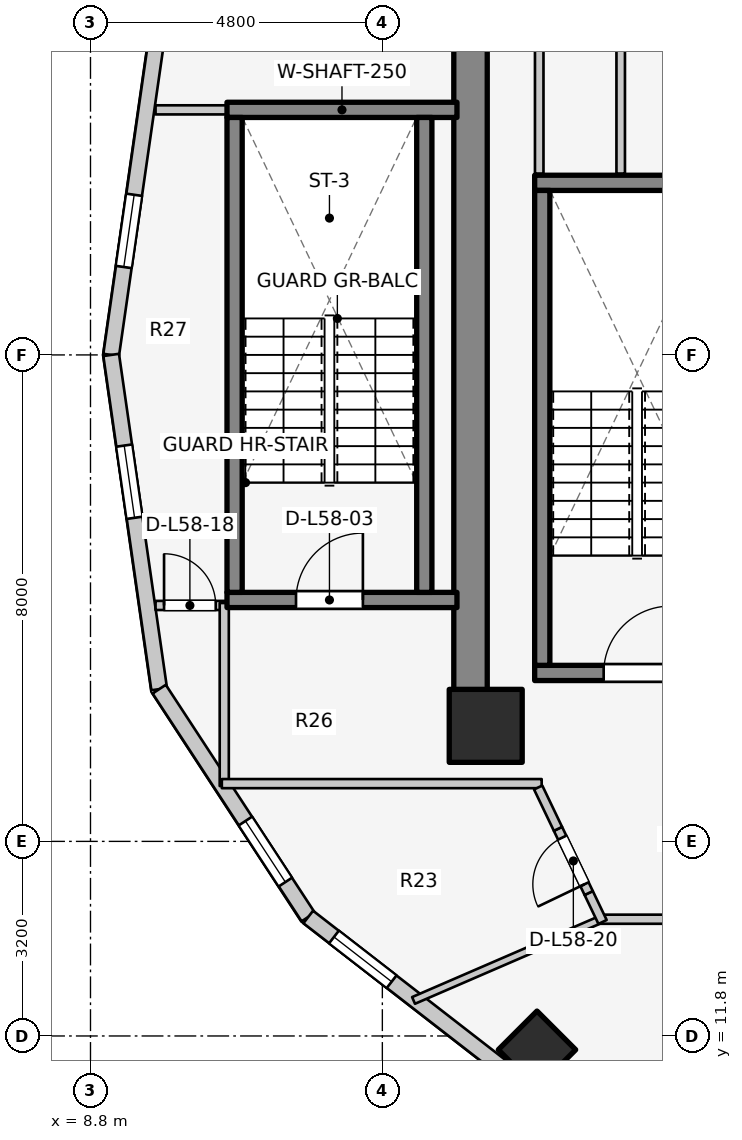
"""IFC4 building model, lengths in metres.
Left out: names, types, materials, properties, quantities, classifications, styles, units other than length and angle.
Written with IfcOpenShell. Run it as: python <this file> out.ifc"""

import sys

from ifc_helpers import new_model, si_unit, direction, frame, frame_2d, origin, origin_2d, place, context, subcontext, project, spatial, rectangle, extrude, element, fill, save


model = new_model("IFC4")
c1 = context("Model", 3, precision=1e-05, world=origin(), true_north=direction((0.0, 1.0)))
c2 = subcontext(c1, "Body", "Model", "MODEL_VIEW")
j1 = project(units=[si_unit("LENGTHUNIT", "METRE"), si_unit("PLANEANGLEUNIT", "RADIAN")], contexts=[c1])
p1 = place(None, origin())
s1 = spatial("IfcSite", under=j1, at=p1, CompositionType="ELEMENT")
p2 = place(p1, origin())
s2 = spatial("IfcBuilding", under=s1, at=p2, CompositionType="ELEMENT")
p3 = place(p2, frame((0.0, 0.0, 190.1)))
s3 = spatial("IfcBuildingStorey", under=s2, at=p3, CompositionType="ELEMENT", Elevation=190.1)
p4 = place(p3, frame((15.05, 17.05, 0.0), z_axis=(0.0, 0.0, 1.0), x_axis=(0.0, 1.0, 0.0)))
e1 = element("IfcWall", 1, at=p4, inside=s3, PredefinedType="SHEAR", context=c2, shape_type="SweptSolid", body=[
    extrude(rectangle(XDim=12.8, YDim=0.55, at=frame_2d((6.4, 0.0))), origin(), (0.0, 0.0, 1.0), 3.1),
])
p5 = place(p3, frame((16.105, 17.77, 0.0), z_axis=(0.0, 0.0, 1.0), x_axis=(1.0, 0.0, 0.0)))
e2 = element("IfcWall", 2, at=p5, inside=s3, PredefinedType="SOLIDWALL", context=c2, shape_type="SweptSolid", body=[
    extrude(rectangle(XDim=3.37, YDim=0.25, at=frame_2d((1.685, 0.0))), origin(), (0.0, 0.0, 1.0), 3.1),
])
p6 = place(p5, frame((1.135, 0.0, 0.0)))
e3 = element("IfcOpeningElement", 3, at=p6, cuts=e2, PredefinedType="OPENING", context=c2, shape_type="SweptSolid", body=[
    extrude(rectangle(XDim=1.1, YDim=2.1, at=frame_2d((0.55, 1.05))), frame((0.0, 0.135, 0.0), z_axis=(0.0, -1.0, 0.0), x_axis=(1.0, 0.0, 0.0)), (0.0, 0.0, 1.0), 0.27),
])
p7 = place(p3, frame((16.105, 25.83, 0.0), z_axis=(0.0, 0.0, 1.0), x_axis=(1.0, 0.0, 0.0)))
e4 = element("IfcWall", 4, at=p7, inside=s3, PredefinedType="SOLIDWALL", context=c2, shape_type="SweptSolid", body=[
    extrude(rectangle(XDim=3.37, YDim=0.25, at=frame_2d((1.685, 0.0))), origin(), (0.0, 0.0, 1.0), 3.1),
])
p8 = place(p3, frame((16.23, 17.895, 0.0), z_axis=(0.0, 0.0, 1.0), x_axis=(0.0, 1.0, 0.0)))
e5 = element("IfcWall", 5, at=p8, inside=s3, PredefinedType="SOLIDWALL", context=c2, shape_type="SweptSolid", body=[
    extrude(rectangle(XDim=7.81, YDim=0.25, at=frame_2d((3.905, 0.0))), origin(), (0.0, 0.0, 1.0), 3.1),
])
p9 = place(p3, frame((11.045, 18.97, 0.0), z_axis=(0.0, 0.0, 1.0), x_axis=(1.0, 0.0, 0.0)))
e6 = element("IfcWall", 6, at=p9, inside=s3, PredefinedType="SOLIDWALL", context=c2, shape_type="SweptSolid", body=[
    extrude(rectangle(XDim=3.782, YDim=0.25, at=frame_2d((1.891, 0.0))), origin(), (0.0, 0.0, 1.0), 3.1),
])
p10 = place(p9, frame((1.135, 0.0, 0.0)))
e7 = element("IfcOpeningElement", 7, at=p10, cuts=e6, PredefinedType="OPENING", context=c2, shape_type="SweptSolid", body=[
    extrude(rectangle(XDim=1.1, YDim=2.1, at=frame_2d((0.55, 1.05))), frame((0.0, 0.135, 0.0), z_axis=(0.0, -1.0, 0.0), x_axis=(1.0, 0.0, 0.0)), (0.0, 0.0, 1.0), 0.27),
])
p11 = place(p3, frame((11.045, 27.03, 0.0), z_axis=(0.0, 0.0, 1.0), x_axis=(1.0, 0.0, 0.0)))
e8 = element("IfcWall", 8, at=p11, inside=s3, PredefinedType="SOLIDWALL", context=c2, shape_type="SweptSolid", body=[
    extrude(rectangle(XDim=3.782, YDim=0.25, at=frame_2d((1.891, 0.0))), origin(), (0.0, 0.0, 1.0), 3.1),
])
for number, where, z_axis, x_axis in (
    (9, (11.17, 19.095, 0.0), (0.0, 0.0, 1.0), (0.0, 1.0, 0.0)),
    (10, (14.29, 19.095, 0.0), (0.0, 0.0, 1.0), (0.0, 1.0, 0.0)),
):
    element("IfcWall", number, at=place(p3, frame(where, z_axis=z_axis, x_axis=x_axis)), inside=s3, PredefinedType="SOLIDWALL", context=c2, shape_type="SweptSolid", body=[
        extrude(rectangle(XDim=7.81, YDim=0.25, at=frame_2d((3.905, 0.0))), origin(), (0.0, 0.0, 1.0), 3.1),
    ])
p12 = place(p3, frame((15.3, 16.9, 0.0), z_axis=(0.0, 0.0, 1.0), x_axis=(1.0, 0.0, 0.0)))
e11 = element("IfcColumn", 11, at=p12, inside=s3, PredefinedType="COLUMN", context=c2, shape_type="SweptSolid", body=[
    extrude(rectangle(XDim=1.2, YDim=1.2, at=origin_2d()), origin(), (0.0, 0.0, 1.0), 3.1),
])
p13 = place(p3, frame((16.143, 11.573, 0.0), z_axis=(0.0, 0.0, 1.0), x_axis=(-0.707106781187, -0.707106781187, 0.0)))
e12 = element("IfcColumn", 12, at=p13, inside=s3, PredefinedType="COLUMN", context=c2, shape_type="SweptSolid", body=[
    extrude(rectangle(XDim=0.9, YDim=0.9, at=origin_2d()), origin(), (0.0, 0.0, 1.0), 3.1),
])
p14 = place(p3, frame((9.93, 28.497, 0.0), z_axis=(0.0, 0.0, 1.0), x_axis=(-0.142227632286, -0.989833976288, 0.0)))
e13 = element("IfcWall", 13, at=p14, inside=s3, PredefinedType="STANDARD", context=c2, shape_type="SweptSolid", body=[
    extrude(rectangle(XDim=5.553, YDim=0.26, at=frame_2d((2.776, 0.0))), origin(), (0.0, 0.0, 1.0), 2.57),
])
p15 = place(p14, frame((2.892, 0.0, 0.75)))
e14 = element("IfcOpeningElement", 14, at=p15, cuts=e13, PredefinedType="OPENING", context=c2, shape_type="SweptSolid", body=[
    extrude(rectangle(XDim=1.2, YDim=1.5, at=frame_2d((0.6, 0.75))), frame((0.0, 0.14, 0.0), z_axis=(0.0, -1.0, 0.0), x_axis=(1.0, 0.0, 0.0)), (0.0, 0.0, 1.0), 0.28),
])
p16 = place(p3, frame((9.14, 23.0, 0.0), z_axis=(0.0, 0.0, 1.0), x_axis=(0.142227632286, -0.989833976288, 0.0)))
e15 = element("IfcWall", 15, at=p16, inside=s3, PredefinedType="STANDARD", context=c2, shape_type="SweptSolid", body=[
    extrude(rectangle(XDim=5.553, YDim=0.26, at=frame_2d((2.776, 0.0))), origin(), (0.0, 0.0, 1.0), 2.57),
])
p17 = place(p16, frame((1.506, 0.0, 0.75)))
e16 = element("IfcOpeningElement", 16, at=p17, cuts=e15, PredefinedType="OPENING", context=c2, shape_type="SweptSolid", body=[
    extrude(rectangle(XDim=1.2, YDim=1.5, at=frame_2d((0.6, 0.75))), frame((0.0, 0.14, 0.0), z_axis=(0.0, -1.0, 0.0), x_axis=(1.0, 0.0, 0.0)), (0.0, 0.0, 1.0), 0.28),
])
p18 = place(p3, frame((9.93, 17.503, 0.0), z_axis=(0.0, 0.0, 1.0), x_axis=(0.547456494366, -0.836834145322, 0.0)))
e17 = element("IfcWall", 17, at=p18, inside=s3, PredefinedType="STANDARD", context=c2, shape_type="SweptSolid", body=[
    extrude(rectangle(XDim=4.477, YDim=0.26, at=frame_2d((2.239, 0.0))), origin(), (0.0, 0.0, 1.0), 1.22),
])
p19 = place(p18, frame((2.591, 0.0, 0.15)))
e18 = element("IfcOpeningElement", 18, at=p19, cuts=e17, PredefinedType="OPENING", context=c2, shape_type="SweptSolid", body=[
    extrude(rectangle(XDim=1.2, YDim=0.9, at=frame_2d((0.6, 0.45))), frame((0.0, 0.14, 0.0), z_axis=(0.0, -1.0, 0.0), x_axis=(1.0, 0.0, 0.0)), (0.0, 0.0, 1.0), 0.28),
])
p20 = place(p3, frame((12.381, 13.757, 0.0), z_axis=(0.0, 0.0, 1.0), x_axis=(0.790185650662, -0.612867552973, 0.0)))
e19 = element("IfcWall", 19, at=p20, inside=s3, PredefinedType="STANDARD", context=c2, shape_type="SweptSolid", body=[
    extrude(rectangle(XDim=4.239, YDim=0.26, at=frame_2d((2.12, 0.0))), origin(), (0.0, 0.0, 1.0), 1.22),
])
p21 = place(p20, frame((0.536, 0.0, 0.15)))
e20 = element("IfcOpeningElement", 20, at=p21, cuts=e19, PredefinedType="OPENING", context=c2, shape_type="SweptSolid", body=[
    extrude(rectangle(XDim=1.2, YDim=0.9, at=frame_2d((0.6, 0.45))), frame((0.0, 0.14, 0.0), z_axis=(0.0, -1.0, 0.0), x_axis=(1.0, 0.0, 0.0)), (0.0, 0.0, 1.0), 0.28),
])
for number, where, z_axis, x_axis in (
    (21, (16.18, 25.98, 0.0), (0.0, 0.0, 1.0), (0.0, 1.0, 0.0)),
    (22, (17.52, 25.98, 0.0), (0.0, 0.0, 1.0), (0.0, 1.0, 0.0)),
):
    element("IfcWall", number, at=place(p3, frame(where, z_axis=z_axis, x_axis=x_axis)), inside=s3, PredefinedType="PLUMBINGWALL", context=c2, shape_type="SweptSolid", body=[
        extrude(rectangle(XDim=3.88, YDim=0.14, at=frame_2d((1.94, 0.0))), origin(), (0.0, 0.0, 1.0), 2.575),
    ])
p22 = place(p3, frame((9.87, 27.03, 0.0), z_axis=(0.0, 0.0, 1.0), x_axis=(1.0, 0.0, 0.0)))
e23 = element("IfcWall", 23, at=p22, inside=s3, PredefinedType="PARTITIONING", context=c2, shape_type="SweptSolid", body=[
    extrude(rectangle(XDim=1.17, YDim=0.15, at=frame_2d((0.585, 0.0))), origin(), (0.0, 0.0, 1.0), 2.575),
])
p23 = place(p3, frame((9.87, 18.88, 0.0), z_axis=(0.0, 0.0, 1.0), x_axis=(1.0, 0.0, 0.0)))
e24 = element("IfcWall", 24, at=p23, inside=s3, PredefinedType="PARTITIONING", context=c2, shape_type="SweptSolid", body=[
    extrude(rectangle(XDim=1.17, YDim=0.15, at=frame_2d((0.585, 0.0))), origin(), (0.0, 0.0, 1.0), 2.575),
])
p24 = place(p23, frame((0.14, 0.0, 0.0)))
e25 = element("IfcOpeningElement", 25, at=p24, cuts=e24, PredefinedType="OPENING", context=c2, shape_type="SweptSolid", body=[
    extrude(rectangle(XDim=0.85, YDim=2.05, at=frame_2d((0.425, 1.025))), frame((0.0, 0.085, 0.0), z_axis=(0.0, -1.0, 0.0), x_axis=(1.0, 0.0, 0.0)), (0.0, 0.0, 1.0), 0.17),
])
p25 = place(p3, frame((11.0, 15.91, 0.0), z_axis=(0.0, 0.0, 1.0), x_axis=(0.0, 1.0, 0.0)))
e26 = element("IfcWall", 26, at=p25, inside=s3, PredefinedType="PARTITIONING", context=c2, shape_type="SweptSolid", body=[
    extrude(rectangle(XDim=3.01, YDim=0.15, at=frame_2d((1.505, 0.0))), origin(), (0.0, 0.0, 1.0), 2.575),
])
p26 = place(p3, frame((10.96, 15.95, 0.0), z_axis=(0.0, 0.0, 1.0), x_axis=(1.0, 0.0, 0.0)))
e27 = element("IfcWall", 27, at=p26, inside=s3, PredefinedType="PARTITIONING", context=c2, shape_type="SweptSolid", body=[
    extrude(rectangle(XDim=5.26, YDim=0.15, at=frame_2d((2.63, 0.0))), origin(), (0.0, 0.0, 1.0), 1.22),
])
p27 = place(p3, frame((17.246, 13.74, 0.0), z_axis=(0.0, 0.0, 1.0), x_axis=(-0.917766865873, -0.397119604031, 0.0)))
e28 = element("IfcWall", 28, at=p27, inside=s3, PredefinedType="MOVABLE", context=c2, shape_type="SweptSolid", body=[
    extrude(rectangle(XDim=3.413, YDim=0.12, at=frame_2d((1.707, 0.0))), origin(), (0.0, 0.0, 1.0), 1.22),
])
p28 = place(p3, frame((17.15, 13.72, 0.0), z_axis=(0.0, 0.0, 1.0), x_axis=(1.0, 0.0, 0.0)))
e29 = element("IfcWall", 29, at=p28, inside=s3, PredefinedType="PARTITIONING", context=c2, shape_type="SweptSolid", body=[
    extrude(rectangle(XDim=1.14, YDim=0.15, at=frame_2d((0.57, 0.0))), origin(), (0.0, 0.0, 1.0), 2.575),
])
p29 = place(p3, frame((17.222, 13.675, 0.0), z_axis=(0.0, 0.0, 1.0), x_axis=(-0.431782981727, 0.901977525602, 0.0)))
e30 = element("IfcWall", 30, at=p29, inside=s3, PredefinedType="PARTITIONING", context=c2, shape_type="SweptSolid", body=[
    extrude(rectangle(XDim=0.528, YDim=0.15, at=frame_2d((0.264, 0.0))), origin(), (0.0, 0.0, 1.0), 2.575),
])
p30 = place(p3, frame((16.994, 14.151, 0.0), z_axis=(0.0, 0.0, 1.0), x_axis=(-0.431957534962, 0.901893944979, 0.0)))
e31 = element("IfcWall", 31, at=p30, inside=s3, PredefinedType="PARTITIONING", context=c2, shape_type="SweptSolid", body=[
    extrude(rectangle(XDim=1.17, YDim=0.15, at=frame_2d((0.585, 0.0))), origin(), (0.0, 0.0, 1.0), 2.575),
])
p31 = place(p30, frame((0.16, 0.0, 0.0)))
e32 = element("IfcOpeningElement", 32, at=p31, cuts=e31, PredefinedType="OPENING", context=c2, shape_type="SweptSolid", body=[
    extrude(rectangle(XDim=0.85, YDim=2.05, at=frame_2d((0.425, 1.025))), frame((0.0, 0.085, 0.0), z_axis=(0.0, -1.0, 0.0), x_axis=(1.0, 0.0, 0.0)), (0.0, 0.0, 1.0), 0.17),
])
p32 = place(p3, frame((16.489, 15.206, 0.0), z_axis=(0.0, 0.0, 1.0), x_axis=(-0.432131149195, 0.901810772776, 0.0)))
e33 = element("IfcWall", 33, at=p32, inside=s3, PredefinedType="PARTITIONING", context=c2, shape_type="SweptSolid", body=[
    extrude(rectangle(XDim=0.754, YDim=0.15, at=frame_2d((0.377, 0.0))), origin(), (0.0, 0.0, 1.0), 1.22),
])
p33 = place(p15, origin())
e34 = element("IfcWindow", 34, at=p33, inside=s3, PartitioningType="SINGLE_PANEL", PredefinedType="WINDOW", context=c2, shape_type="SweptSolid", body=[
    extrude(rectangle(XDim=1.2, YDim=1.5, at=frame_2d((0.6, 0.75))), frame((0.0, 0.03, 0.0), z_axis=(0.0, -1.0, 0.0), x_axis=(1.0, 0.0, 0.0)), (0.0, 0.0, 1.0), 0.06),
])
fill(e14, e34)
p34 = place(p17, origin())
e35 = element("IfcWindow", 35, at=p34, inside=s3, PartitioningType="SINGLE_PANEL", PredefinedType="WINDOW", context=c2, shape_type="SweptSolid", body=[
    extrude(rectangle(XDim=1.2, YDim=1.5, at=frame_2d((0.6, 0.75))), frame((0.0, 0.03, 0.0), z_axis=(0.0, -1.0, 0.0), x_axis=(1.0, 0.0, 0.0)), (0.0, 0.0, 1.0), 0.06),
])
fill(e16, e35)
p35 = place(p19, origin())
e36 = element("IfcWindow", 36, at=p35, inside=s3, PartitioningType="SINGLE_PANEL", PredefinedType="WINDOW", context=c2, shape_type="SweptSolid", body=[
    extrude(rectangle(XDim=1.2, YDim=0.9, at=frame_2d((0.6, 0.45))), frame((0.0, 0.03, 0.0), z_axis=(0.0, -1.0, 0.0), x_axis=(1.0, 0.0, 0.0)), (0.0, 0.0, 1.0), 0.06),
])
fill(e18, e36)
p36 = place(p21, origin())
e37 = element("IfcWindow", 37, at=p36, inside=s3, PartitioningType="SINGLE_PANEL", PredefinedType="WINDOW", context=c2, shape_type="SweptSolid", body=[
    extrude(rectangle(XDim=1.2, YDim=0.9, at=frame_2d((0.6, 0.45))), frame((0.0, 0.03, 0.0), z_axis=(0.0, -1.0, 0.0), x_axis=(1.0, 0.0, 0.0)), (0.0, 0.0, 1.0), 0.06),
])
fill(e20, e37)
p37 = place(p6, origin())
e38 = element("IfcDoor", 38, at=p37, inside=s3, OperationType="SINGLE_SWING_RIGHT", PredefinedType="DOOR", context=c2, shape_type="SweptSolid", body=[
    extrude(rectangle(XDim=1.1, YDim=2.1, at=frame_2d((0.55, 1.05))), frame((0.0, 0.025, 0.0), z_axis=(0.0, -1.0, 0.0), x_axis=(1.0, 0.0, 0.0)), (0.0, 0.0, 1.0), 0.05),
])
fill(e3, e38)
p38 = place(p10, origin())
e39 = element("IfcDoor", 39, at=p38, inside=s3, OperationType="SINGLE_SWING_RIGHT", PredefinedType="DOOR", context=c2, shape_type="SweptSolid", body=[
    extrude(rectangle(XDim=1.1, YDim=2.1, at=frame_2d((0.55, 1.05))), frame((0.0, 0.025, 0.0), z_axis=(0.0, -1.0, 0.0), x_axis=(1.0, 0.0, 0.0)), (0.0, 0.0, 1.0), 0.05),
])
fill(e7, e39)
p39 = place(p24, origin())
e40 = element("IfcDoor", 40, at=p39, inside=s3, OperationType="SINGLE_SWING_LEFT", PredefinedType="DOOR", context=c2, shape_type="SweptSolid", body=[
    extrude(rectangle(XDim=0.85, YDim=2.05, at=frame_2d((0.425, 1.025))), frame((0.0, 0.025, 0.0), z_axis=(0.0, -1.0, 0.0), x_axis=(1.0, 0.0, 0.0)), (0.0, 0.0, 1.0), 0.05),
])
fill(e25, e40)
p40 = place(p31, origin())
e41 = element("IfcDoor", 41, at=p40, inside=s3, OperationType="SINGLE_SWING_LEFT", PredefinedType="DOOR", context=c2, shape_type="SweptSolid", body=[
    extrude(rectangle(XDim=0.85, YDim=2.05, at=frame_2d((0.425, 1.025))), frame((0.0, 0.025, 0.0), z_axis=(0.0, -1.0, 0.0), x_axis=(1.0, 0.0, 0.0)), (0.0, 0.0, 1.0), 0.05),
])
fill(e32, e41)
save(model, sys.argv[1])
